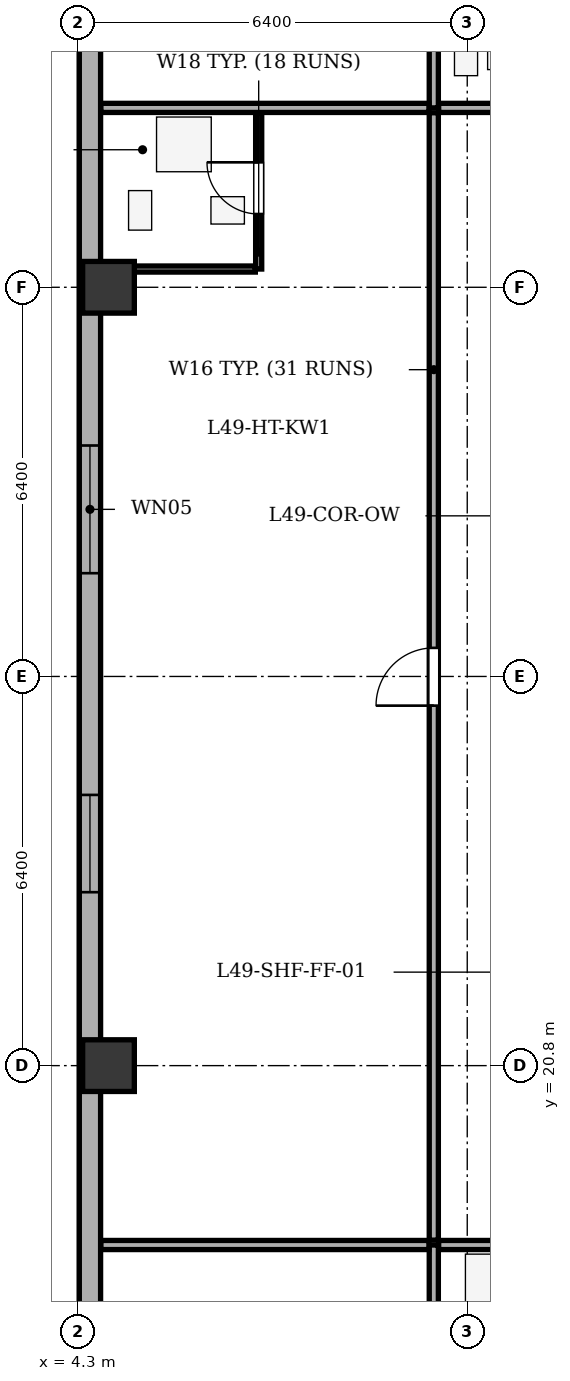
"""IFC4 building model, lengths in metres.
Left out: names, types, materials, properties, quantities, classifications, styles, units other than length and angle.
Written with IfcOpenShell. Run it as: python <this file> out.ifc"""

import sys

from ifc_helpers import new_model, si_unit, direction, frame, frame_2d, origin, origin_2d, place, context, subcontext, project, spatial, rectangle, extrude, element, fill, save


model = new_model("IFC4")
c1 = context("Model", 3, precision=1e-05, world=origin(), true_north=direction((0.0, 1.0)))
c2 = subcontext(c1, "Body", "Model", "MODEL_VIEW")
j1 = project(units=[si_unit("LENGTHUNIT", "METRE"), si_unit("PLANEANGLEUNIT", "RADIAN")], contexts=[c1])
p1 = place(None, origin())
s1 = spatial("IfcSite", under=j1, at=p1, CompositionType="ELEMENT")
p2 = place(p1, origin())
s2 = spatial("IfcBuilding", under=s1, at=p2, CompositionType="ELEMENT")
p3 = place(p2, frame((0.0, 0.0, 190.3)))
s3 = spatial("IfcBuildingStorey", under=s2, at=p3, CompositionType="ELEMENT", Elevation=190.3)
for number, where, z_axis, x_axis in (
    (1, (4.8, 20.8, 0.0), (0.0, 0.0, 1.0), (1.0, 0.0, 0.0)),
    (2, (4.8, 33.6, 0.0), (0.0, 0.0, 1.0), (1.0, 0.0, 0.0)),
):
    element("IfcColumn", number, at=place(p3, frame(where, z_axis=z_axis, x_axis=x_axis)), inside=s3, PredefinedType="COLUMN", context=c2, shape_type="SweptSolid", body=[
        extrude(rectangle(XDim=0.85, YDim=0.85, at=origin_2d()), origin(), (0.0, 0.0, 1.0), 3.5),
    ])
p4 = place(p3, frame((4.495, 12.9, 0.0), z_axis=(0.0, 0.0, 1.0), x_axis=(0.0, 1.0, 0.0)))
e3 = element("IfcWall", 3, at=p4, inside=s3, PredefinedType="STANDARD", context=c2, shape_type="SweptSolid", body=[
    extrude(rectangle(XDim=35.0, YDim=0.35, at=frame_2d((17.5, 0.0))), origin(), (0.0, 0.0, 1.0), 2.785),
])
p5 = place(p4, frame((1.813, 0.0, 0.75)))
e4 = element("IfcOpeningElement", 4, at=p5, cuts=e3, PredefinedType="OPENING", context=c2, shape_type="SweptSolid", body=[
    extrude(rectangle(XDim=1.6, YDim=1.75, at=frame_2d((0.8, 0.875))), frame((0.0, 0.185, 0.0), z_axis=(0.0, -1.0, 0.0), x_axis=(1.0, 0.0, 0.0)), (0.0, 0.0, 1.0), 0.37),
])
p6 = place(p4, frame((10.752, 0.0, 0.75)))
e5 = element("IfcOpeningElement", 5, at=p6, cuts=e3, PredefinedType="OPENING", context=c2, shape_type="SweptSolid", body=[
    extrude(rectangle(XDim=1.6, YDim=1.75, at=frame_2d((0.8, 0.875))), frame((0.0, 0.185, 0.0), z_axis=(0.0, -1.0, 0.0), x_axis=(1.0, 0.0, 0.0)), (0.0, 0.0, 1.0), 0.37),
])
p7 = place(p4, frame((15.998, 0.0, 0.75)))
e6 = element("IfcOpeningElement", 6, at=p7, cuts=e3, PredefinedType="OPENING", context=c2, shape_type="SweptSolid", body=[
    extrude(rectangle(XDim=2.1, YDim=1.75, at=frame_2d((1.05, 0.875))), frame((0.0, 0.185, 0.0), z_axis=(0.0, -1.0, 0.0), x_axis=(1.0, 0.0, 0.0)), (0.0, 0.0, 1.0), 0.37),
])
p8 = place(p4, frame((25.97, 0.0, 0.75)))
e7 = element("IfcOpeningElement", 7, at=p8, cuts=e3, PredefinedType="OPENING", context=c2, shape_type="SweptSolid", body=[
    extrude(rectangle(XDim=1.6, YDim=1.75, at=frame_2d((0.8, 0.875))), frame((0.0, 0.185, 0.0), z_axis=(0.0, -1.0, 0.0), x_axis=(1.0, 0.0, 0.0)), (0.0, 0.0, 1.0), 0.37),
])
p9 = place(p4, frame((30.555, 0.0, 0.75)))
e8 = element("IfcOpeningElement", 8, at=p9, cuts=e3, PredefinedType="OPENING", context=c2, shape_type="SweptSolid", body=[
    extrude(rectangle(XDim=2.1, YDim=1.75, at=frame_2d((1.05, 0.875))), frame((0.0, 0.185, 0.0), z_axis=(0.0, -1.0, 0.0), x_axis=(1.0, 0.0, 0.0)), (0.0, 0.0, 1.0), 0.37),
])
p10 = place(p3, frame((10.15, 8.275, 0.0), z_axis=(0.0, 0.0, 1.0), x_axis=(0.0, 1.0, 0.0)))
e9 = element("IfcWall", 9, at=p10, inside=s3, PredefinedType="PARTITIONING", context=c2, shape_type="SweptSolid", body=[
    extrude(rectangle(XDim=9.575, YDim=0.15, at=frame_2d((4.788, 0.0))), origin(), (0.0, 0.0, 1.0), 3.2),
])
p11 = place(p3, frame((10.23, 17.85, 0.0), z_axis=(0.0, 0.0, 1.0), x_axis=(1.0, 0.0, 0.0)))
e10 = element("IfcWall", 10, at=p11, inside=s3, PredefinedType="PARTITIONING", context=c2, shape_type="SweptSolid", body=[
    extrude(rectangle(XDim=1.82, YDim=0.15, at=frame_2d((0.91, 0.0))), origin(), (0.0, 0.0, 1.0), 3.2),
])
p12 = place(p3, frame((10.15, 36.55, 0.0), z_axis=(0.0, 0.0, 1.0), x_axis=(0.0, 1.0, 0.0)))
e11 = element("IfcWall", 11, at=p12, inside=s3, PredefinedType="PARTITIONING", context=c2, shape_type="SweptSolid", body=[
    extrude(rectangle(XDim=15.975, YDim=0.15, at=frame_2d((7.987, 0.0))), origin(), (0.0, 0.0, 1.0), 3.2),
])
p13 = place(p3, frame((10.23, 36.55, 0.0), z_axis=(0.0, 0.0, 1.0), x_axis=(1.0, 0.0, 0.0)))
e12 = element("IfcWall", 12, at=p13, inside=s3, PredefinedType="PARTITIONING", context=c2, shape_type="SweptSolid", body=[
    extrude(rectangle(XDim=1.57, YDim=0.15, at=frame_2d((0.785, 0.0))), origin(), (0.0, 0.0, 1.0), 3.2),
])
for number, where, z_axis, x_axis in (
    (13, (4.675, 17.85, 0.0), (0.0, 0.0, 1.0), (1.0, 0.0, 0.0)),
    (14, (4.675, 36.55, 0.0), (0.0, 0.0, 1.0), (1.0, 0.0, 0.0)),
):
    element("IfcWall", number, at=place(p3, frame(where, z_axis=z_axis, x_axis=x_axis)), inside=s3, PredefinedType="PARTITIONING", context=c2, shape_type="SweptSolid", body=[
        extrude(rectangle(XDim=5.395, YDim=0.15, at=frame_2d((2.698, 0.0))), origin(), (0.0, 0.0, 1.0), 3.2),
    ])
p14 = place(p3, frame((10.15, 17.93, 0.0), z_axis=(0.0, 0.0, 1.0), x_axis=(0.0, 1.0, 0.0)))
e15 = element("IfcWall", 15, at=p14, inside=s3, PredefinedType="PARTITIONING", context=c2, shape_type="SweptSolid", body=[
    extrude(rectangle(XDim=18.54, YDim=0.15, at=frame_2d((9.27, 0.0))), origin(), (0.0, 0.0, 1.0), 3.2),
])
p15 = place(p14, frame((8.79, 0.0, 0.0)))
e16 = element("IfcOpeningElement", 16, at=p15, cuts=e15, PredefinedType="OPENING", context=c2, shape_type="SweptSolid", body=[
    extrude(rectangle(XDim=0.95, YDim=2.1, at=frame_2d((0.475, 1.05))), frame((0.0, 0.085, 0.0), z_axis=(0.0, -1.0, 0.0), x_axis=(1.0, 0.0, 0.0)), (0.0, 0.0, 1.0), 0.17),
])
p16 = place(p3, frame((7.27, 33.9, 0.0), z_axis=(0.0, 0.0, 1.0), x_axis=(0.0, 1.0, 0.0)))
e17 = element("IfcWall", 17, at=p16, inside=s3, PredefinedType="PARTITIONING", context=c2, shape_type="SweptSolid", body=[
    extrude(rectangle(XDim=2.57, YDim=0.1, at=frame_2d((1.285, 0.0))), origin(), (0.0, 0.0, 1.0), 3.2),
])
p17 = place(p16, frame((0.905, 0.0, 0.0)))
e18 = element("IfcOpeningElement", 18, at=p17, cuts=e17, PredefinedType="OPENING", context=c2, shape_type="SweptSolid", body=[
    extrude(rectangle(XDim=0.85, YDim=2.05, at=frame_2d((0.425, 1.025))), frame((0.0, 0.06, 0.0), z_axis=(0.0, -1.0, 0.0), x_axis=(1.0, 0.0, 0.0)), (0.0, 0.0, 1.0), 0.12),
])
p18 = place(p3, frame((4.675, 33.9, 0.0), z_axis=(0.0, 0.0, 1.0), x_axis=(1.0, 0.0, 0.0)))
e19 = element("IfcWall", 19, at=p18, inside=s3, PredefinedType="PARTITIONING", context=c2, shape_type="SweptSolid", body=[
    extrude(rectangle(XDim=2.54, YDim=0.1, at=frame_2d((1.27, 0.0))), origin(), (0.0, 0.0, 1.0), 2.535),
])
p19 = place(p6, origin())
e20 = element("IfcWindow", 20, at=p19, inside=s3, PartitioningType="SINGLE_PANEL", PredefinedType="WINDOW", context=c2, shape_type="SweptSolid", body=[
    extrude(rectangle(XDim=1.6, YDim=1.75, at=frame_2d((0.8, 0.875))), frame((0.0, -0.01, 0.0), z_axis=(0.0, -1.0, 0.0), x_axis=(1.0, 0.0, 0.0)), (0.0, 0.0, 1.0), 0.06),
])
fill(e5, e20)
p20 = place(p7, origin())
e21 = element("IfcWindow", 21, at=p20, inside=s3, PartitioningType="SINGLE_PANEL", PredefinedType="WINDOW", context=c2, shape_type="SweptSolid", body=[
    extrude(rectangle(XDim=2.1, YDim=1.75, at=frame_2d((1.05, 0.875))), frame((0.0, -0.01, 0.0), z_axis=(0.0, -1.0, 0.0), x_axis=(1.0, 0.0, 0.0)), (0.0, 0.0, 1.0), 0.06),
])
fill(e6, e21)
p21 = place(p17, origin())
e22 = element("IfcDoor", 22, at=p21, inside=s3, OperationType="SINGLE_SWING_RIGHT", PredefinedType="DOOR", context=c2, shape_type="SweptSolid", body=[
    extrude(rectangle(XDim=0.85, YDim=2.05, at=frame_2d((0.425, 1.025))), frame((0.0, 0.025, 0.0), z_axis=(0.0, -1.0, 0.0), x_axis=(1.0, 0.0, 0.0)), (0.0, 0.0, 1.0), 0.05),
])
fill(e18, e22)
p22 = place(p15, origin())
e23 = element("IfcDoor", 23, at=p22, inside=s3, OperationType="SINGLE_SWING_LEFT", PredefinedType="DOOR", context=c2, shape_type="SweptSolid", body=[
    extrude(rectangle(XDim=0.95, YDim=2.1, at=frame_2d((0.475, 1.05))), frame((0.0, 0.025, 0.0), z_axis=(0.0, -1.0, 0.0), x_axis=(1.0, 0.0, 0.0)), (0.0, 0.0, 1.0), 0.05),
])
fill(e16, e23)
save(model, sys.argv[1])
